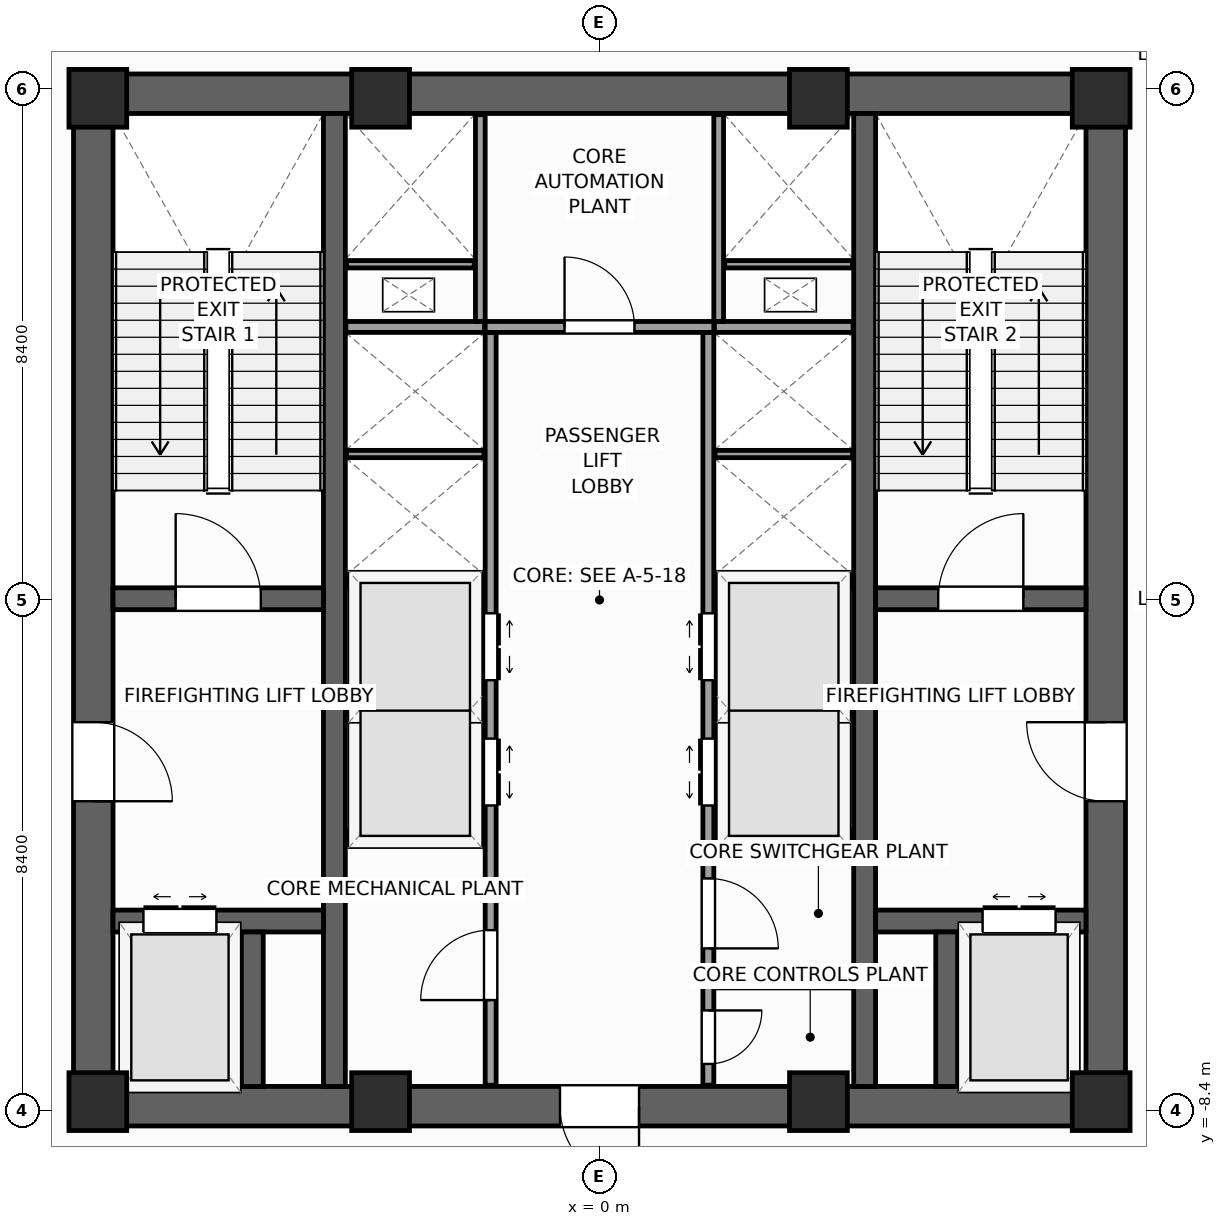
"""IFC4 building model, lengths in metres.
Left out: names, types, materials, properties, quantities, classifications, styles, units other than length and angle.
Written with IfcOpenShell. Run it as: python <this file> out.ifc"""

import sys

from ifc_helpers import new_model, si_unit, direction, frame, frame_2d, origin, origin_2d, place, context, subcontext, project, spatial, rectangle, extrude, source, transform, mapped, element, fill, save


model = new_model("IFC4")
c1 = context("Model", 3, precision=1e-05, world=origin(), true_north=direction((0.0, 1.0)))
c2 = subcontext(c1, "Body", "Model", "MODEL_VIEW")
j1 = project(units=[si_unit("LENGTHUNIT", "METRE"), si_unit("PLANEANGLEUNIT", "RADIAN")], contexts=[c1])
p1 = place(None, origin())
s1 = spatial("IfcSite", under=j1, at=p1, CompositionType="ELEMENT")
p2 = place(p1, origin())
s2 = spatial("IfcBuilding", under=s1, at=p2, CompositionType="ELEMENT")
p3 = place(p2, frame((0.0, 0.0, 200.4)))
s3 = spatial("IfcBuildingStorey", under=s2, at=p3, CompositionType="ELEMENT", Elevation=200.4)
p4 = place(p3, frame((-8.65, -8.325, 0.0), z_axis=(0.0, 0.0, 1.0), x_axis=(1.0, 0.0, 0.0)))
e1 = element("IfcWall", 1, at=p4, inside=s3, PredefinedType="SHEAR", context=c2, shape_type="SweptSolid", body=[
    extrude(rectangle(XDim=17.3, YDim=0.65, at=frame_2d((8.65, 0.0))), origin(), (0.0, 0.0, 1.0), 5.2),
])
p5 = place(p4, frame((8.0, 0.0, 0.0)))
e2 = element("IfcOpeningElement", 2, at=p5, cuts=e1, PredefinedType="OPENING", context=c2, shape_type="SweptSolid", body=[
    extrude(rectangle(XDim=1.3, YDim=2.2, at=frame_2d((0.65, 1.1))), frame((0.0, 0.335, 0.0), z_axis=(0.0, -1.0, 0.0), x_axis=(1.0, 0.0, 0.0)), (0.0, 0.0, 1.0), 0.67),
])
p6 = place(p3, frame((-8.65, 8.325, 0.0), z_axis=(0.0, 0.0, 1.0), x_axis=(1.0, 0.0, 0.0)))
e3 = element("IfcWall", 3, at=p6, inside=s3, PredefinedType="SHEAR", context=c2, shape_type="SweptSolid", body=[
    extrude(rectangle(XDim=17.3, YDim=0.65, at=frame_2d((8.65, 0.0))), origin(), (0.0, 0.0, 1.0), 5.2),
])
p7 = place(p3, frame((-8.325, -8.0, 0.0), z_axis=(0.0, 0.0, 1.0), x_axis=(0.0, 1.0, 0.0)))
e4 = element("IfcWall", 4, at=p7, inside=s3, PredefinedType="SHEAR", context=c2, shape_type="SweptSolid", body=[
    extrude(rectangle(XDim=16.0, YDim=0.65, at=frame_2d((8.0, 0.0))), origin(), (0.0, 0.0, 1.0), 5.2),
])
p8 = place(p7, frame((4.69, 0.0, 0.0)))
e5 = element("IfcOpeningElement", 5, at=p8, cuts=e4, PredefinedType="OPENING", context=c2, shape_type="SweptSolid", body=[
    extrude(rectangle(XDim=1.3, YDim=2.2, at=frame_2d((0.65, 1.1))), frame((0.0, 0.335, 0.0), z_axis=(0.0, -1.0, 0.0), x_axis=(1.0, 0.0, 0.0)), (0.0, 0.0, 1.0), 0.67),
])
p9 = place(p3, frame((8.325, -8.0, 0.0), z_axis=(0.0, 0.0, 1.0), x_axis=(0.0, 1.0, 0.0)))
e6 = element("IfcWall", 6, at=p9, inside=s3, PredefinedType="SHEAR", context=c2, shape_type="SweptSolid", body=[
    extrude(rectangle(XDim=16.0, YDim=0.65, at=frame_2d((8.0, 0.0))), origin(), (0.0, 0.0, 1.0), 5.2),
])
p10 = place(p9, frame((4.69, 0.0, 0.0)))
e7 = element("IfcOpeningElement", 7, at=p10, cuts=e6, PredefinedType="OPENING", context=c2, shape_type="SweptSolid", body=[
    extrude(rectangle(XDim=1.3, YDim=2.2, at=frame_2d((0.65, 1.1))), frame((0.0, 0.335, 0.0), z_axis=(0.0, -1.0, 0.0), x_axis=(1.0, 0.0, 0.0)), (0.0, 0.0, 1.0), 0.67),
])
for number, where, z_axis, x_axis in (
    (8, (-4.36, -8.0, 0.0), (0.0, 0.0, 1.0), (0.0, 1.0, 0.0)),
    (9, (4.36, -8.0, 0.0), (0.0, 0.0, 1.0), (0.0, 1.0, 0.0)),
):
    element("IfcWall", number, at=place(p3, frame(where, z_axis=z_axis, x_axis=x_axis)), inside=s3, PredefinedType="SHEAR", context=c2, shape_type="SweptSolid", body=[
        extrude(rectangle(XDim=16.0, YDim=0.36, at=frame_2d((8.0, 0.0))), origin(), (0.0, 0.0, 1.0), 5.2),
    ])
p11 = place(p3, frame((-8.0, 0.02, 0.0), z_axis=(0.0, 0.0, 1.0), x_axis=(1.0, 0.0, 0.0)))
e10 = element("IfcWall", 10, at=p11, inside=s3, PredefinedType="SHEAR", context=c2, shape_type="SweptSolid", body=[
    extrude(rectangle(XDim=3.46, YDim=0.36, at=frame_2d((1.73, 0.0))), origin(), (0.0, 0.0, 1.0), 5.2),
])
p12 = place(p11, frame((1.03, 0.0, 0.0)))
e11 = element("IfcOpeningElement", 11, at=p12, cuts=e10, PredefinedType="OPENING", context=c2, shape_type="SweptSolid", body=[
    extrude(rectangle(XDim=1.4, YDim=2.2, at=frame_2d((0.7, 1.1))), frame((0.0, 0.19, 0.0), z_axis=(0.0, -1.0, 0.0), x_axis=(1.0, 0.0, 0.0)), (0.0, 0.0, 1.0), 0.38),
])
p13 = place(p3, frame((4.54, 0.02, 0.0), z_axis=(0.0, 0.0, 1.0), x_axis=(1.0, 0.0, 0.0)))
e12 = element("IfcWall", 12, at=p13, inside=s3, PredefinedType="SHEAR", context=c2, shape_type="SweptSolid", body=[
    extrude(rectangle(XDim=3.46, YDim=0.36, at=frame_2d((1.73, 0.0))), origin(), (0.0, 0.0, 1.0), 5.2),
])
p14 = place(p13, frame((1.03, 0.0, 0.0)))
e13 = element("IfcOpeningElement", 13, at=p14, cuts=e12, PredefinedType="OPENING", context=c2, shape_type="SweptSolid", body=[
    extrude(rectangle(XDim=1.4, YDim=2.2, at=frame_2d((0.7, 1.1))), frame((0.0, 0.19, 0.0), z_axis=(0.0, -1.0, 0.0), x_axis=(1.0, 0.0, 0.0)), (0.0, 0.0, 1.0), 0.38),
])
p15 = place(p3, frame((-8.0, -5.28, 0.0), z_axis=(0.0, 0.0, 1.0), x_axis=(1.0, 0.0, 0.0)))
e14 = element("IfcWall", 14, at=p15, inside=s3, PredefinedType="SHEAR", context=c2, shape_type="SweptSolid", body=[
    extrude(rectangle(XDim=3.46, YDim=0.36, at=frame_2d((1.73, 0.0))), origin(), (0.0, 0.0, 1.0), 5.2),
])
p16 = place(p15, frame((0.5, 0.0, 0.0)))
e15 = element("IfcOpeningElement", 15, at=p16, cuts=e14, PredefinedType="OPENING", context=c2, shape_type="SweptSolid", body=[
    extrude(rectangle(XDim=1.2, YDim=2.25, at=frame_2d((0.6, 1.125))), frame((0.0, 0.19, 0.0), z_axis=(0.0, -1.0, 0.0), x_axis=(1.0, 0.0, 0.0)), (0.0, 0.0, 1.0), 0.38),
])
p17 = place(p3, frame((4.54, -5.28, 0.0), z_axis=(0.0, 0.0, 1.0), x_axis=(1.0, 0.0, 0.0)))
e16 = element("IfcWall", 16, at=p17, inside=s3, PredefinedType="SHEAR", context=c2, shape_type="SweptSolid", body=[
    extrude(rectangle(XDim=3.46, YDim=0.36, at=frame_2d((1.73, 0.0))), origin(), (0.0, 0.0, 1.0), 5.2),
])
p18 = place(p17, frame((1.76, 0.0, 0.0)))
e17 = element("IfcOpeningElement", 17, at=p18, cuts=e16, PredefinedType="OPENING", context=c2, shape_type="SweptSolid", body=[
    extrude(rectangle(XDim=1.2, YDim=2.25, at=frame_2d((0.6, 1.125))), frame((0.0, 0.19, 0.0), z_axis=(0.0, -1.0, 0.0), x_axis=(1.0, 0.0, 0.0)), (0.0, 0.0, 1.0), 0.38),
])
for number, where, z_axis, x_axis in (
    (18, (-5.71, -8.0, 0.0), (0.0, 0.0, 1.0), (0.0, 1.0, 0.0)),
    (19, (5.71, -8.0, 0.0), (0.0, 0.0, 1.0), (0.0, 1.0, 0.0)),
):
    element("IfcWall", number, at=place(p3, frame(where, z_axis=z_axis, x_axis=x_axis)), inside=s3, PredefinedType="SHEAR", context=c2, shape_type="SweptSolid", body=[
        extrude(rectangle(XDim=2.54, YDim=0.36, at=frame_2d((1.27, 0.0))), origin(), (0.0, 0.0, 1.0), 5.2),
    ])
m1 = source(origin(), c2, "Body", "SweptSolid", [
    extrude(rectangle(XDim=0.95, YDim=0.95, at=origin_2d()), origin(), (0.0, 0.0, 1.0), 5.2),
])
for number, where, z_axis, x_axis in (
    (20, (-8.25, -8.25, 0.0), (0.0, 0.0, 1.0), (1.0, 0.0, 0.0)),
    (21, (8.25, -8.25, 0.0), (0.0, 0.0, 1.0), (1.0, 0.0, 0.0)),
    (22, (8.25, 8.25, 0.0), (0.0, 0.0, 1.0), (1.0, 0.0, 0.0)),
    (23, (-8.25, 8.25, 0.0), (0.0, 0.0, 1.0), (1.0, 0.0, 0.0)),
    (24, (-3.6, -8.25, 0.0), (0.0, 0.0, 1.0), (1.0, 0.0, 0.0)),
    (25, (3.6, -8.25, 0.0), (0.0, 0.0, 1.0), (1.0, 0.0, 0.0)),
    (26, (-3.6, 8.25, 0.0), (0.0, 0.0, 1.0), (1.0, 0.0, 0.0)),
    (27, (3.6, 8.25, 0.0), (0.0, 0.0, 1.0), (1.0, 0.0, 0.0)),
):
    element("IfcColumn", number, at=place(p3, frame(where, z_axis=z_axis, x_axis=x_axis)), inside=s3, PredefinedType="PILASTER", context=c2, shape_type="MappedRepresentation", body=[
        mapped(m1, transform((0.0, 0.0, 0.0), scale=1.0)),
    ])
p19 = place(p3, frame((-1.79, -7.98, 0.0), z_axis=(0.0, 0.0, 1.0), x_axis=(0.0, 1.0, 0.0)))
e28 = element("IfcWall", 28, at=p19, inside=s3, PredefinedType="PARTITIONING", context=c2, shape_type="SweptSolid", body=[
    extrude(rectangle(XDim=12.38, YDim=0.18, at=frame_2d((6.19, 0.0))), origin(), (0.0, 0.0, 1.0), 4.96),
])
p20 = place(p19, frame((4.6, 0.0, 0.0)))
e29 = element("IfcOpeningElement", 29, at=p20, cuts=e28, PredefinedType="OPENING", context=c2, shape_type="SweptSolid", body=[
    extrude(rectangle(XDim=1.1, YDim=2.2, at=frame_2d((0.55, 1.1))), frame((0.0, 0.1, 0.0), z_axis=(0.0, -1.0, 0.0), x_axis=(1.0, 0.0, 0.0)), (0.0, 0.0, 1.0), 0.2),
])
p21 = place(p19, frame((6.66, 0.0, 0.0)))
e30 = element("IfcOpeningElement", 30, at=p21, cuts=e28, PredefinedType="OPENING", context=c2, shape_type="SweptSolid", body=[
    extrude(rectangle(XDim=1.1, YDim=2.2, at=frame_2d((0.55, 1.1))), frame((0.0, 0.1, 0.0), z_axis=(0.0, -1.0, 0.0), x_axis=(1.0, 0.0, 0.0)), (0.0, 0.0, 1.0), 0.2),
])
p22 = place(p19, frame((1.4, 0.0, 0.0)))
e31 = element("IfcOpeningElement", 31, at=p22, cuts=e28, PredefinedType="OPENING", context=c2, shape_type="SweptSolid", body=[
    extrude(rectangle(XDim=1.15, YDim=2.25, at=frame_2d((0.575, 1.125))), frame((0.0, 0.1, 0.0), z_axis=(0.0, -1.0, 0.0), x_axis=(1.0, 0.0, 0.0)), (0.0, 0.0, 1.0), 0.2),
])
p23 = place(p3, frame((1.79, -7.98, 0.0), z_axis=(0.0, 0.0, 1.0), x_axis=(0.0, 1.0, 0.0)))
e32 = element("IfcWall", 32, at=p23, inside=s3, PredefinedType="PARTITIONING", context=c2, shape_type="SweptSolid", body=[
    extrude(rectangle(XDim=12.38, YDim=0.18, at=frame_2d((6.19, 0.0))), origin(), (0.0, 0.0, 1.0), 4.96),
])
p24 = place(p23, frame((4.6, 0.0, 0.0)))
e33 = element("IfcOpeningElement", 33, at=p24, cuts=e32, PredefinedType="OPENING", context=c2, shape_type="SweptSolid", body=[
    extrude(rectangle(XDim=1.1, YDim=2.2, at=frame_2d((0.55, 1.1))), frame((0.0, 0.1, 0.0), z_axis=(0.0, -1.0, 0.0), x_axis=(1.0, 0.0, 0.0)), (0.0, 0.0, 1.0), 0.2),
])
p25 = place(p23, frame((6.66, 0.0, 0.0)))
e34 = element("IfcOpeningElement", 34, at=p25, cuts=e32, PredefinedType="OPENING", context=c2, shape_type="SweptSolid", body=[
    extrude(rectangle(XDim=1.1, YDim=2.2, at=frame_2d((0.55, 1.1))), frame((0.0, 0.1, 0.0), z_axis=(0.0, -1.0, 0.0), x_axis=(1.0, 0.0, 0.0)), (0.0, 0.0, 1.0), 0.2),
])
p26 = place(p23, frame((0.35, 0.0, 0.0)))
e35 = element("IfcOpeningElement", 35, at=p26, cuts=e32, PredefinedType="OPENING", context=c2, shape_type="SweptSolid", body=[
    extrude(rectangle(XDim=0.88, YDim=2.1, at=frame_2d((0.44, 1.05))), frame((0.0, 0.1, 0.0), z_axis=(0.0, -1.0, 0.0), x_axis=(1.0, 0.0, 0.0)), (0.0, 0.0, 1.0), 0.2),
])
p27 = place(p23, frame((2.25, 0.0, 0.0)))
e36 = element("IfcOpeningElement", 36, at=p27, cuts=e32, PredefinedType="OPENING", context=c2, shape_type="SweptSolid", body=[
    extrude(rectangle(XDim=1.15, YDim=2.25, at=frame_2d((0.575, 1.125))), frame((0.0, 0.1, 0.0), z_axis=(0.0, -1.0, 0.0), x_axis=(1.0, 0.0, 0.0)), (0.0, 0.0, 1.0), 0.2),
])
p28 = place(p3, frame((-1.88, 4.49, 0.0), z_axis=(0.0, 0.0, 1.0), x_axis=(1.0, 0.0, 0.0)))
e37 = element("IfcWall", 37, at=p28, inside=s3, PredefinedType="PARTITIONING", context=c2, shape_type="SweptSolid", body=[
    extrude(rectangle(XDim=3.76, YDim=0.18, at=frame_2d((1.88, 0.0))), origin(), (0.0, 0.0, 1.0), 4.96),
])
p29 = place(p28, frame((1.305, 0.0, 0.0)))
e38 = element("IfcOpeningElement", 38, at=p29, cuts=e37, PredefinedType="OPENING", context=c2, shape_type="SweptSolid", body=[
    extrude(rectangle(XDim=1.15, YDim=2.25, at=frame_2d((0.575, 1.125))), frame((0.0, 0.1, 0.0), z_axis=(0.0, -1.0, 0.0), x_axis=(1.0, 0.0, 0.0)), (0.0, 0.0, 1.0), 0.2),
])
for number, where, z_axis, x_axis in (
    (39, (-4.17, -3.9, 0.0), (0.0, 0.0, 1.0), (1.0, 0.0, 0.0)),
    (40, (1.89, -3.9, 0.0), (0.0, 0.0, 1.0), (1.0, 0.0, 0.0)),
    (41, (-4.17, 0.3, 0.0), (0.0, 0.0, 1.0), (1.0, 0.0, 0.0)),
    (42, (1.89, 0.3, 0.0), (0.0, 0.0, 1.0), (1.0, 0.0, 0.0)),
    (43, (-4.17, 4.49, 0.0), (0.0, 0.0, 1.0), (1.0, 0.0, 0.0)),
    (44, (1.89, 4.49, 0.0), (0.0, 0.0, 1.0), (1.0, 0.0, 0.0)),
):
    element("IfcWall", number, at=place(p3, frame(where, z_axis=z_axis, x_axis=x_axis)), inside=s3, PredefinedType="PARTITIONING", context=c2, shape_type="SweptSolid", body=[
        extrude(rectangle(XDim=2.28, YDim=0.18, at=frame_2d((1.14, 0.0))), origin(), (0.0, 0.0, 1.0), 4.96),
    ])
for number, where, z_axis, x_axis in (
    (45, (-4.16, -1.8, 0.0), (0.0, 0.0, 1.0), (1.0, 0.0, 0.0)),
    (46, (1.9, -1.8, 0.0), (0.0, 0.0, 1.0), (1.0, 0.0, 0.0)),
    (47, (-4.16, 2.4, 0.0), (0.0, 0.0, 1.0), (1.0, 0.0, 0.0)),
    (48, (1.9, 2.4, 0.0), (0.0, 0.0, 1.0), (1.0, 0.0, 0.0)),
):
    element("IfcWall", number, at=place(p3, frame(where, z_axis=z_axis, x_axis=x_axis)), inside=s3, PredefinedType="PARTITIONING", context=c2, shape_type="SweptSolid", body=[
        extrude(rectangle(XDim=2.26, YDim=0.12, at=frame_2d((1.13, 0.0))), origin(), (0.0, 0.0, 1.0), 4.96),
    ])
p30 = place(p3, frame((1.89, -6.3, 0.0), z_axis=(0.0, 0.0, 1.0), x_axis=(1.0, 0.0, 0.0)))
e49 = element("IfcWall", 49, at=p30, inside=s3, PredefinedType="PARTITIONING", context=c2, shape_type="SweptSolid", body=[
    extrude(rectangle(XDim=2.28, YDim=0.16, at=frame_2d((1.14, 0.0))), origin(), (0.0, 0.0, 1.0), 4.96),
])
for number, where, z_axis, x_axis in (
    (50, (-1.96, 4.58, 0.0), (0.0, 0.0, 1.0), (0.0, 1.0, 0.0)),
    (51, (1.96, 4.58, 0.0), (0.0, 0.0, 1.0), (0.0, 1.0, 0.0)),
):
    element("IfcWall", number, at=place(p3, frame(where, z_axis=z_axis, x_axis=x_axis)), inside=s3, PredefinedType="PARTITIONING", context=c2, shape_type="SweptSolid", body=[
        extrude(rectangle(XDim=3.4, YDim=0.16, at=frame_2d((1.7, 0.0))), origin(), (0.0, 0.0, 1.0), 4.96),
    ])
for number, where, z_axis, x_axis in (
    (52, (-4.16, 5.52, 0.0), (0.0, 0.0, 1.0), (1.0, 0.0, 0.0)),
    (53, (2.06, 5.52, 0.0), (0.0, 0.0, 1.0), (1.0, 0.0, 0.0)),
):
    element("IfcWall", number, at=place(p3, frame(where, z_axis=z_axis, x_axis=x_axis)), inside=s3, PredefinedType="PARTITIONING", context=c2, shape_type="SweptSolid", body=[
        extrude(rectangle(XDim=2.1, YDim=0.12, at=frame_2d((1.05, 0.0))), origin(), (0.0, 0.0, 1.0), 4.96),
    ])
m2 = source(origin(), c2, "Body", "SweptSolid", [
    extrude(rectangle(XDim=1.4, YDim=2.2, at=frame_2d((0.7, 1.1))), frame((0.0, 0.025, 0.0), z_axis=(0.0, -1.0, 0.0), x_axis=(1.0, 0.0, 0.0)), (0.0, 0.0, 1.0), 0.05),
])
p31 = place(p12, origin())
e54 = element("IfcDoor", 54, at=p31, inside=s3, OperationType="SINGLE_SWING_LEFT", PredefinedType="DOOR", context=c2, shape_type="MappedRepresentation", body=[
    mapped(m2, transform((0.0, 0.0, 0.0), scale=1.0)),
])
fill(e11, e54)
p32 = place(p14, origin())
e55 = element("IfcDoor", 55, at=p32, inside=s3, OperationType="SINGLE_SWING_RIGHT", PredefinedType="DOOR", context=c2, shape_type="MappedRepresentation", body=[
    mapped(m2, transform((0.0, 0.0, 0.0), scale=1.0)),
])
fill(e13, e55)
m3 = source(origin(), c2, "Body", "SweptSolid", [
    extrude(rectangle(XDim=1.3, YDim=2.2, at=frame_2d((0.65, 1.1))), frame((0.0, 0.025, 0.0), z_axis=(0.0, -1.0, 0.0), x_axis=(1.0, 0.0, 0.0)), (0.0, 0.0, 1.0), 0.05),
])
p33 = place(p8, frame((1.3, 0.0, 0.0), z_axis=(0.0, 0.0, 1.0), x_axis=(-1.0, 0.0, 0.0)))
e56 = element("IfcDoor", 56, at=p33, inside=s3, OperationType="SINGLE_SWING_LEFT", PredefinedType="DOOR", context=c2, shape_type="MappedRepresentation", body=[
    mapped(m3, transform((0.0, 0.0, 0.0), scale=1.0)),
])
fill(e5, e56)
p34 = place(p10, origin())
e57 = element("IfcDoor", 57, at=p34, inside=s3, OperationType="SINGLE_SWING_RIGHT", PredefinedType="DOOR", context=c2, shape_type="MappedRepresentation", body=[
    mapped(m3, transform((0.0, 0.0, 0.0), scale=1.0)),
])
fill(e7, e57)
p35 = place(p5, frame((1.3, 0.0, 0.0), z_axis=(0.0, 0.0, 1.0), x_axis=(-1.0, 0.0, 0.0)))
e58 = element("IfcDoor", 58, at=p35, inside=s3, OperationType="SINGLE_SWING_RIGHT", PredefinedType="DOOR", context=c2, shape_type="MappedRepresentation", body=[
    mapped(m3, transform((0.0, 0.0, 0.0), scale=1.0)),
])
fill(e2, e58)
m4 = source(origin(), c2, "Body", "SweptSolid", [
    extrude(rectangle(XDim=1.2, YDim=2.25, at=frame_2d((0.6, 1.125))), frame((0.0, 0.025, 0.0), z_axis=(0.0, -1.0, 0.0), x_axis=(1.0, 0.0, 0.0)), (0.0, 0.0, 1.0), 0.05),
])
p36 = place(p16, origin())
e59 = element("IfcDoor", 59, at=p36, inside=s3, OperationType="DOUBLE_DOOR_SLIDING", PredefinedType="DOOR", context=c2, shape_type="MappedRepresentation", body=[
    mapped(m4, transform((0.0, 0.0, 0.0), scale=1.0)),
])
fill(e15, e59)
p37 = place(p18, origin())
e60 = element("IfcDoor", 60, at=p37, inside=s3, OperationType="DOUBLE_DOOR_SLIDING", PredefinedType="DOOR", context=c2, shape_type="MappedRepresentation", body=[
    mapped(m4, transform((0.0, 0.0, 0.0), scale=1.0)),
])
fill(e17, e60)
m5 = source(origin(), c2, "Body", "SweptSolid", [
    extrude(rectangle(XDim=1.1, YDim=2.2, at=frame_2d((0.55, 1.1))), frame((0.0, 0.025, 0.0), z_axis=(0.0, -1.0, 0.0), x_axis=(1.0, 0.0, 0.0)), (0.0, 0.0, 1.0), 0.05),
])
p38 = place(p20, frame((1.1, 0.0, 0.0), z_axis=(0.0, 0.0, 1.0), x_axis=(-1.0, 0.0, 0.0)))
e61 = element("IfcDoor", 61, at=p38, inside=s3, OperationType="DOUBLE_DOOR_SLIDING", PredefinedType="DOOR", context=c2, shape_type="MappedRepresentation", body=[
    mapped(m5, transform((0.0, 0.0, 0.0), scale=1.0)),
])
fill(e29, e61)
p39 = place(p21, frame((1.1, 0.0, 0.0), z_axis=(0.0, 0.0, 1.0), x_axis=(-1.0, 0.0, 0.0)))
e62 = element("IfcDoor", 62, at=p39, inside=s3, OperationType="DOUBLE_DOOR_SLIDING", PredefinedType="DOOR", context=c2, shape_type="MappedRepresentation", body=[
    mapped(m5, transform((0.0, 0.0, 0.0), scale=1.0)),
])
fill(e30, e62)
p40 = place(p24, origin())
e63 = element("IfcDoor", 63, at=p40, inside=s3, OperationType="DOUBLE_DOOR_SLIDING", PredefinedType="DOOR", context=c2, shape_type="MappedRepresentation", body=[
    mapped(m5, transform((0.0, 0.0, 0.0), scale=1.0)),
])
fill(e33, e63)
p41 = place(p25, origin())
e64 = element("IfcDoor", 64, at=p41, inside=s3, OperationType="DOUBLE_DOOR_SLIDING", PredefinedType="DOOR", context=c2, shape_type="MappedRepresentation", body=[
    mapped(m5, transform((0.0, 0.0, 0.0), scale=1.0)),
])
fill(e34, e64)
m6 = source(origin(), c2, "Body", "SweptSolid", [
    extrude(rectangle(XDim=1.15, YDim=2.25, at=frame_2d((0.575, 1.125))), frame((0.0, 0.025, 0.0), z_axis=(0.0, -1.0, 0.0), x_axis=(1.0, 0.0, 0.0)), (0.0, 0.0, 1.0), 0.05),
])
p42 = place(p22, origin())
e65 = element("IfcDoor", 65, at=p42, inside=s3, OperationType="SINGLE_SWING_LEFT", PredefinedType="DOOR", context=c2, shape_type="MappedRepresentation", body=[
    mapped(m6, transform((0.0, 0.0, 0.0), scale=1.0)),
])
fill(e31, e65)
m7 = source(origin(), c2, "Body", "SweptSolid", [
    extrude(rectangle(XDim=0.88, YDim=2.1, at=frame_2d((0.44, 1.05))), frame((0.0, 0.025, 0.0), z_axis=(0.0, -1.0, 0.0), x_axis=(1.0, 0.0, 0.0)), (0.0, 0.0, 1.0), 0.05),
])
p43 = place(p26, frame((0.88, 0.0, 0.0), z_axis=(0.0, 0.0, 1.0), x_axis=(-1.0, 0.0, 0.0)))
e66 = element("IfcDoor", 66, at=p43, inside=s3, OperationType="SINGLE_SWING_RIGHT", PredefinedType="DOOR", context=c2, shape_type="MappedRepresentation", body=[
    mapped(m7, transform((0.0, 0.0, 0.0), scale=1.0)),
])
fill(e35, e66)
p44 = place(p27, frame((1.15, 0.0, 0.0), z_axis=(0.0, 0.0, 1.0), x_axis=(-1.0, 0.0, 0.0)))
e67 = element("IfcDoor", 67, at=p44, inside=s3, OperationType="SINGLE_SWING_LEFT", PredefinedType="DOOR", context=c2, shape_type="MappedRepresentation", body=[
    mapped(m6, transform((0.0, 0.0, 0.0), scale=1.0)),
])
fill(e36, e67)
p45 = place(p29, origin())
e68 = element("IfcDoor", 68, at=p45, inside=s3, OperationType="SINGLE_SWING_LEFT", PredefinedType="DOOR", context=c2, shape_type="MappedRepresentation", body=[
    mapped(m6, transform((0.0, 0.0, 0.0), scale=1.0)),
])
fill(e38, e68)
save(model, sys.argv[1])
